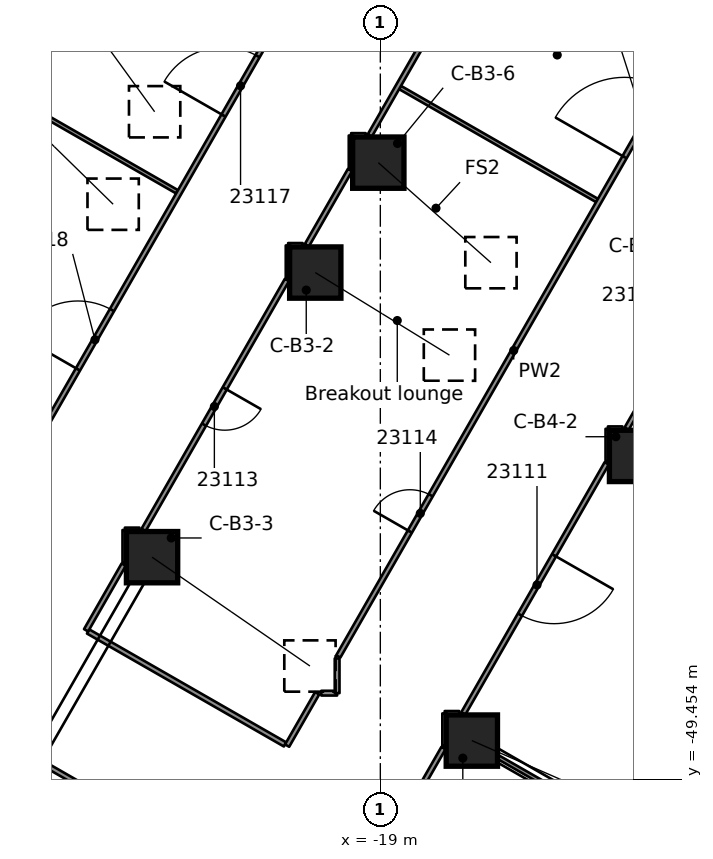
"""IFC4 building model, lengths in metres.
Left out: names, types, materials, properties, quantities, classifications, styles, units other than length and angle.
Written with IfcOpenShell. Run it as: python <this file> out.ifc"""

import sys

from ifc_helpers import new_model, si_unit, direction, frame, frame_2d, origin, origin_2d, place, context, subcontext, project, spatial, rectangle, extrude, element, fill, save


model = new_model("IFC4")
c1 = context("Model", 3, precision=1e-05, world=origin(), true_north=direction((0.0, 1.0)))
c2 = subcontext(c1, "Body", "Model", "MODEL_VIEW")
j1 = project(units=[si_unit("LENGTHUNIT", "METRE"), si_unit("PLANEANGLEUNIT", "RADIAN")], contexts=[c1])
p1 = place(None, origin())
s1 = spatial("IfcSite", under=j1, at=p1, CompositionType="ELEMENT")
p2 = place(p1, origin())
s2 = spatial("IfcBuilding", under=s1, at=p2, CompositionType="ELEMENT")
p3 = place(p2, frame((0.0, 0.0, 119.7)))
s3 = spatial("IfcBuildingStorey", under=s2, at=p3, CompositionType="ELEMENT", Elevation=119.7)
p4 = place(p3, frame((-29.126, -31.29, 0.562), z_axis=(0.59544523528, -0.58257531381, 0.553218741116), x_axis=(0.699339877275, 0.714789294865, 0.0)))
e1 = element("IfcColumn", 1, at=p4, inside=s3, PredefinedType="COLUMN", context=c2, shape_type="SweptSolid", body=[
    extrude(rectangle(XDim=1.35, YDim=1.35, at=origin_2d()), origin(), (0.0, 0.0, 1.0), 5.198),
])
p5 = place(p3, frame((-27.468, -28.399, 0.561), z_axis=(0.488269073322, -0.673037368275, 0.555530388857), x_axis=(0.809429244298, 0.587217420105, 0.0)))
e2 = element("IfcColumn", 2, at=p5, inside=s3, PredefinedType="COLUMN", context=c2, shape_type="SweptSolid", body=[
    extrude(rectangle(XDim=1.35, YDim=1.35, at=origin_2d()), origin(), (0.0, 0.0, 1.0), 5.18),
])
p6 = place(p3, frame((-20.712, -36.116, 0.554), z_axis=(0.698438997856, -0.429842046596, 0.572205191564), x_axis=(0.524126993738, 0.851640120259, 0.0)))
e3 = element("IfcColumn", 3, at=p6, inside=s3, PredefinedType="COLUMN", context=c2, shape_type="SweptSolid", body=[
    extrude(rectangle(XDim=1.35, YDim=1.35, at=origin_2d()), origin(), (0.0, 0.0, 1.0), 5.056),
])
p7 = place(p3, frame((-25.007, -43.605, 0.589), z_axis=(0.718653578755, -0.495359605874, 0.488012186948), x_axis=(0.567528313926, 0.823353880718, 0.0)))
e4 = element("IfcColumn", 4, at=p7, inside=s3, PredefinedType="COLUMN", context=c2, shape_type="SweptSolid", body=[
    extrude(rectangle(XDim=1.35, YDim=1.35, at=origin_2d()), origin(), (0.0, 0.0, 1.0), 5.782),
])
p8 = place(p3, frame((-19.053, -33.224, 0.544), z_axis=(0.602598141129, -0.535091265352, 0.592075010494), x_axis=(0.663981445411, 0.747749048913, 0.0)))
e5 = element("IfcColumn", 5, at=p8, inside=s3, PredefinedType="COLUMN", context=c2, shape_type="SweptSolid", body=[
    extrude(rectangle(XDim=1.35, YDim=1.35, at=origin_2d()), origin(), (0.0, 0.0, 1.0), 4.918),
])
p9 = place(p3, frame((-12.297, -40.941, 0.555), z_axis=(0.780519662206, -0.259596659581, 0.568681484879), x_axis=(0.315596852865, 0.948893369385, 0.0)))
e6 = element("IfcColumn", 6, at=p9, inside=s3, PredefinedType="COLUMN", context=c2, shape_type="SweptSolid", body=[
    extrude(rectangle(XDim=1.35, YDim=1.35, at=origin_2d()), origin(), (0.0, 0.0, 1.0), 5.081),
])
p10 = place(p3, frame((-16.592, -48.431, 0.588), z_axis=(0.798018191469, -0.349453953001, 0.490967311352), x_axis=(0.401128075959, 0.916021979364, 0.0)))
e7 = element("IfcColumn", 7, at=p10, inside=s3, PredefinedType="COLUMN", context=c2, shape_type="SweptSolid", body=[
    extrude(rectangle(XDim=1.35, YDim=1.35, at=origin_2d()), origin(), (0.0, 0.0, 1.0), 5.752),
])
p11 = place(p3, frame((-20.171, -53.449, 0.0), z_axis=(0.0, 0.0, 1.0), x_axis=(-0.867500052813, 0.497437089861, 0.0)))
e8 = element("IfcWall", 8, at=p11, inside=s3, PredefinedType="PARTITIONING", context=c2, shape_type="SweptSolid", body=[
    extrude(rectangle(XDim=13.179, YDim=0.125, at=frame_2d((6.59, 0.0))), origin(), (0.0, 0.0, 1.0), 3.58),
])
p12 = place(p11, frame((2.292, 0.0, 0.0)))
e9 = element("IfcOpeningElement", 9, at=p12, cuts=e8, PredefinedType="OPENING", context=c2, shape_type="SweptSolid", body=[
    extrude(rectangle(XDim=1.8, YDim=2.1, at=frame_2d((0.9, 1.05))), frame((0.0, 0.073, 0.0), z_axis=(0.0, -1.0, 0.0), x_axis=(1.0, 0.0, 0.0)), (0.0, 0.0, 1.0), 0.145),
])
p13 = place(p11, frame((9.441, 0.0, 0.0)))
e10 = element("IfcOpeningElement", 10, at=p13, cuts=e8, PredefinedType="OPENING", context=c2, shape_type="SweptSolid", body=[
    extrude(rectangle(XDim=0.9, YDim=2.1, at=frame_2d((0.45, 1.05))), frame((0.0, 0.073, 0.0), z_axis=(0.0, -1.0, 0.0), x_axis=(1.0, 0.0, 0.0)), (0.0, 0.0, 1.0), 0.145),
])
p14 = place(p3, frame((-26.689, -45.56, 0.0), z_axis=(0.0, 0.0, 1.0), x_axis=(0.867459879492, -0.497507143136, 0.0)))
e11 = element("IfcWall", 11, at=p14, inside=s3, PredefinedType="PARTITIONING", context=c2, shape_type="SweptSolid", body=[
    extrude(rectangle(XDim=5.974, YDim=0.125, at=frame_2d((2.987, 0.0))), origin(), (0.0, 0.0, 1.0), 3.58),
])
p15 = place(p3, frame((-17.219, -48.11, 0.0), z_axis=(0.0, 0.0, 1.0), x_axis=(0.867494881958, -0.49744610741, 0.0)))
e12 = element("IfcWall", 12, at=p15, inside=s3, PredefinedType="PARTITIONING", context=c2, shape_type="SweptSolid", body=[
    extrude(rectangle(XDim=16.044, YDim=0.1, at=frame_2d((8.022, 0.0))), origin(), (0.0, 0.0, 1.0), 3.58),
])
p16 = place(p3, frame((-38.261, -26.013, 0.0), z_axis=(0.0, 0.0, 1.0), x_axis=(0.867479537308, -0.497472865945, 0.0)))
e13 = element("IfcWall", 13, at=p16, inside=s3, PredefinedType="PARTITIONING", context=c2, shape_type="SweptSolid", body=[
    extrude(rectangle(XDim=16.037, YDim=0.1, at=frame_2d((8.019, 0.0))), origin(), (0.0, 0.0, 1.0), 3.58),
])
p17 = place(p3, frame((-12.924, -40.544, 0.0), z_axis=(0.0, 0.0, 1.0), x_axis=(0.867484083191, -0.497464938876, 0.0)))
e14 = element("IfcWall", 14, at=p17, inside=s3, PredefinedType="PARTITIONING", context=c2, shape_type="SweptSolid", body=[
    extrude(rectangle(XDim=15.519, YDim=0.1, at=frame_2d((7.759, 0.0))), origin(), (0.0, 0.0, 1.0), 3.58),
])
p18 = place(p3, frame((-18.481, -31.247, 0.0), z_axis=(0.0, 0.0, 1.0), x_axis=(0.867459879492, -0.497507143136, 0.0)))
e15 = element("IfcWall", 15, at=p18, inside=s3, PredefinedType="PARTITIONING", context=c2, shape_type="SweptSolid", body=[
    extrude(rectangle(XDim=5.974, YDim=0.1, at=frame_2d((2.987, 0.0))), origin(), (0.0, 0.0, 1.0), 3.58),
])
p19 = place(p3, frame((-17.306, -47.716, 0.0), z_axis=(0.0, 0.0, 1.0), x_axis=(1.0, 0.0, 0.0)))
e16 = element("IfcWall", 16, at=p19, inside=s3, PredefinedType="PARTITIONING", context=c2, shape_type="SweptSolid", body=[
    extrude(rectangle(XDim=0.382, YDim=0.125, at=frame_2d((0.191, 0.0))), origin(), (0.0, 0.0, 1.0), 3.58),
])
p20 = place(p3, frame((-20.553, -47.183, 0.0), z_axis=(0.0, 0.0, 1.0), x_axis=(1.0, 0.0, 0.0)))
e17 = element("IfcWall", 17, at=p20, inside=s3, PredefinedType="PARTITIONING", context=c2, shape_type="SweptSolid", body=[
    extrude(rectangle(XDim=0.416, YDim=0.125, at=frame_2d((0.208, 0.0))), origin(), (0.0, 0.0, 1.0), 3.58),
])
p21 = place(p3, frame((-25.722, -42.89, 0.0), z_axis=(0.0, 0.0, 1.0), x_axis=(1.0, 0.0, 0.0)))
e18 = element("IfcWall", 18, at=p21, inside=s3, PredefinedType="PARTITIONING", context=c2, shape_type="SweptSolid", body=[
    extrude(rectangle(XDim=0.384, YDim=0.125, at=frame_2d((0.192, 0.0))), origin(), (0.0, 0.0, 1.0), 3.58),
])
for number, where, z_axis, x_axis in (
    (19, (-13.011, -40.227, 0.0), (0.0, 0.0, 1.0), (1.0, 0.0, 0.0)),
    (20, (-21.426, -35.402, 0.0), (0.0, 0.0, 1.0), (1.0, 0.0, 0.0)),
):
    element("IfcWall", number, at=place(p3, frame(where, z_axis=z_axis, x_axis=x_axis)), inside=s3, PredefinedType="PARTITIONING", context=c2, shape_type="SweptSolid", body=[
        extrude(rectangle(XDim=0.382, YDim=0.125, at=frame_2d((0.191, 0.0))), origin(), (0.0, 0.0, 1.0), 3.58),
    ])
p22 = place(p3, frame((-19.768, -32.51, 0.0), z_axis=(0.0, 0.0, 1.0), x_axis=(1.0, 0.0, 0.0)))
e21 = element("IfcWall", 21, at=p22, inside=s3, PredefinedType="PARTITIONING", context=c2, shape_type="SweptSolid", body=[
    extrude(rectangle(XDim=0.383, YDim=0.125, at=frame_2d((0.191, 0.0))), origin(), (0.0, 0.0, 1.0), 3.58),
])
p23 = place(p3, frame((-21.453, -48.563, 0.0), z_axis=(0.0, 0.0, 1.0), x_axis=(0.497743370952, 0.867324354941, 0.0)))
e22 = element("IfcWall", 22, at=p23, inside=s3, PredefinedType="PARTITIONING", context=c2, shape_type="SweptSolid", body=[
    extrude(rectangle(XDim=1.589, YDim=0.125, at=frame_2d((0.794, 0.0))), origin(), (0.0, 0.0, 1.0), 3.58),
])
p24 = place(p3, frame((-20.12, -53.478, 0.0), z_axis=(0.0, 0.0, 1.0), x_axis=(0.497511151809, 0.867457580418, 0.0)))
e23 = element("IfcWall", 23, at=p24, inside=s3, PredefinedType="PARTITIONING", context=c2, shape_type="SweptSolid", body=[
    extrude(rectangle(XDim=5.592, YDim=0.125, at=frame_2d((2.796, 0.0))), origin(), (0.0, 0.0, 1.0), 3.58),
])
p25 = place(p3, frame((-13.043, -41.137, 0.0), z_axis=(0.0, 0.0, 1.0), x_axis=(-0.497476495559, -0.867477455826, 0.0)))
e24 = element("IfcWall", 24, at=p25, inside=s3, PredefinedType="PARTITIONING", context=c2, shape_type="SweptSolid", body=[
    extrude(rectangle(XDim=7.584, YDim=0.125, at=frame_2d((3.792, 0.0))), origin(), (0.0, 0.0, 1.0), 3.58),
])
p26 = place(p25, frame((2.788, 0.0, 0.0)))
e25 = element("IfcOpeningElement", 25, at=p26, cuts=e24, PredefinedType="OPENING", context=c2, shape_type="SweptSolid", body=[
    extrude(rectangle(XDim=1.8, YDim=2.1, at=frame_2d((0.9, 1.05))), frame((0.0, 0.073, 0.0), z_axis=(0.0, -1.0, 0.0), x_axis=(1.0, 0.0, 0.0)), (0.0, 0.0, 1.0), 0.145),
])
p27 = place(p3, frame((-11.385, -38.246, 0.0), z_axis=(0.0, 0.0, 1.0), x_axis=(-0.497325070569, -0.867564276687, 0.0)))
e26 = element("IfcWall", 26, at=p27, inside=s3, PredefinedType="PARTITIONING", context=c2, shape_type="SweptSolid", body=[
    extrude(rectangle(XDim=2.282, YDim=0.125, at=frame_2d((1.141, 0.0))), origin(), (0.0, 0.0, 1.0), 3.58),
])
p28 = place(p27, frame((0.538, 0.0, 0.0)))
e27 = element("IfcOpeningElement", 27, at=p28, cuts=e26, PredefinedType="OPENING", context=c2, shape_type="SweptSolid", body=[
    extrude(rectangle(XDim=1.1, YDim=2.1, at=frame_2d((0.55, 1.05))), frame((0.0, 0.073, 0.0), z_axis=(0.0, -1.0, 0.0), x_axis=(1.0, 0.0, 0.0)), (0.0, 0.0, 1.0), 0.145),
])
p29 = place(p3, frame((-20.106, -46.216, 0.0), z_axis=(0.0, 0.0, 1.0), x_axis=(0.497433217502, 0.867502273268, 0.0)))
e28 = element("IfcWall", 28, at=p29, inside=s3, PredefinedType="PARTITIONING", context=c2, shape_type="SweptSolid", body=[
    extrude(rectangle(XDim=18.559, YDim=0.125, at=frame_2d((9.28, 0.0))), origin(), (0.0, 0.0, 1.0), 3.58),
])
p30 = place(p29, frame((15.143, 0.0, 0.0)))
e29 = element("IfcOpeningElement", 29, at=p30, cuts=e28, PredefinedType="OPENING", context=c2, shape_type="SweptSolid", body=[
    extrude(rectangle(XDim=2.1, YDim=2.1, at=frame_2d((1.05, 1.05))), frame((0.0, 0.073, 0.0), z_axis=(0.0, -1.0, 0.0), x_axis=(1.0, 0.0, 0.0)), (0.0, 0.0, 1.0), 0.145),
])
p31 = place(p29, frame((3.788, 0.0, 0.0)))
e30 = element("IfcOpeningElement", 30, at=p31, cuts=e28, PredefinedType="OPENING", context=c2, shape_type="SweptSolid", body=[
    extrude(rectangle(XDim=1.1, YDim=2.1, at=frame_2d((0.55, 1.05))), frame((0.0, 0.073, 0.0), z_axis=(0.0, -1.0, 0.0), x_axis=(1.0, 0.0, 0.0)), (0.0, 0.0, 1.0), 0.145),
])
p32 = place(p3, frame((-21.458, -36.312, 0.0), z_axis=(0.0, 0.0, 1.0), x_axis=(-0.497504635005, -0.867461317955, 0.0)))
e31 = element("IfcWall", 31, at=p32, inside=s3, PredefinedType="PARTITIONING", context=c2, shape_type="SweptSolid", body=[
    extrude(rectangle(XDim=7.582, YDim=0.125, at=frame_2d((3.791, 0.0))), origin(), (0.0, 0.0, 1.0), 3.58),
])
p33 = place(p32, frame((3.288, 0.0, 0.0)))
e32 = element("IfcOpeningElement", 32, at=p33, cuts=e31, PredefinedType="OPENING", context=c2, shape_type="SweptSolid", body=[
    extrude(rectangle(XDim=1.1, YDim=2.1, at=frame_2d((0.55, 1.05))), frame((0.0, 0.073, 0.0), z_axis=(0.0, -1.0, 0.0), x_axis=(1.0, 0.0, 0.0)), (0.0, 0.0, 1.0), 0.145),
])
p34 = place(p3, frame((-20.935, -35.4, 0.0), z_axis=(0.0, 0.0, 1.0), x_axis=(0.497462427817, 0.86748552317, 0.0)))
e33 = element("IfcWall", 33, at=p34, inside=s3, PredefinedType="PARTITIONING", context=c2, shape_type="SweptSolid", body=[
    extrude(rectangle(XDim=2.283, YDim=0.125, at=frame_2d((1.142, 0.0))), origin(), (0.0, 0.0, 1.0), 3.58),
])
p35 = place(p3, frame((-19.277, -32.509, 0.0), z_axis=(0.0, 0.0, 1.0), x_axis=(0.497782718783, 0.867301772673, 0.0)))
e34 = element("IfcWall", 34, at=p35, inside=s3, PredefinedType="PARTITIONING", context=c2, shape_type="SweptSolid", body=[
    extrude(rectangle(XDim=7.098, YDim=0.125, at=frame_2d((3.549, 0.0))), origin(), (0.0, 0.0, 1.0), 3.58),
])
p36 = place(p3, frame((-26.743, -45.529, 0.0), z_axis=(0.0, 0.0, 1.0), x_axis=(0.497102378574, 0.867691895327, 0.0)))
e35 = element("IfcWall", 35, at=p36, inside=s3, PredefinedType="PARTITIONING", context=c2, shape_type="SweptSolid", body=[
    extrude(rectangle(XDim=1.991, YDim=0.125, at=frame_2d((0.996, 0.0))), origin(), (0.0, 0.0, 1.0), 3.58),
])
p37 = place(p3, frame((-28.623, -41.57, 0.0), z_axis=(0.0, 0.0, 1.0), x_axis=(0.497445996274, 0.867494945686, 0.0)))
e36 = element("IfcWall", 36, at=p37, inside=s3, PredefinedType="PARTITIONING", context=c2, shape_type="SweptSolid", body=[
    extrude(rectangle(XDim=19.081, YDim=0.125, at=frame_2d((9.541, 0.0))), origin(), (0.0, 0.0, 1.0), 3.58),
])
p38 = place(p37, frame((11.051, 0.0, 0.0)))
e37 = element("IfcOpeningElement", 37, at=p38, cuts=e36, PredefinedType="OPENING", context=c2, shape_type="SweptSolid", body=[
    extrude(rectangle(XDim=1.8, YDim=2.1, at=frame_2d((0.9, 1.05))), frame((0.0, 0.073, 0.0), z_axis=(0.0, -1.0, 0.0), x_axis=(1.0, 0.0, 0.0)), (0.0, 0.0, 1.0), 0.145),
])
p39 = place(p37, frame((3.35, 0.0, 0.0)))
e38 = element("IfcOpeningElement", 38, at=p39, cuts=e36, PredefinedType="OPENING", context=c2, shape_type="SweptSolid", body=[
    extrude(rectangle(XDim=1.8, YDim=2.1, at=frame_2d((0.9, 1.05))), frame((0.0, 0.073, 0.0), z_axis=(0.0, -1.0, 0.0), x_axis=(1.0, 0.0, 0.0)), (0.0, 0.0, 1.0), 0.145),
])
p40 = place(p3, frame((-13.011, -41.082, 0.0), z_axis=(0.0, 0.0, 1.0), x_axis=(0.0, 1.0, 0.0)))
e39 = element("IfcWall", 39, at=p40, inside=s3, PredefinedType="PARTITIONING", context=c2, shape_type="SweptSolid", body=[
    extrude(rectangle(XDim=0.855, YDim=0.125, at=frame_2d((0.427, 0.0))), origin(), (0.0, 0.0, 1.0), 3.58),
])
p41 = place(p3, frame((-17.306, -48.572, 0.0), z_axis=(0.0, 0.0, 1.0), x_axis=(0.0, 1.0, 0.0)))
e40 = element("IfcWall", 40, at=p41, inside=s3, PredefinedType="PARTITIONING", context=c2, shape_type="SweptSolid", body=[
    extrude(rectangle(XDim=0.856, YDim=0.125, at=frame_2d((0.428, 0.0))), origin(), (0.0, 0.0, 1.0), 3.58),
])
p42 = place(p3, frame((-19.768, -33.365, 0.0), z_axis=(0.0, 0.0, 1.0), x_axis=(0.0, 1.0, 0.0)))
e41 = element("IfcWall", 41, at=p42, inside=s3, PredefinedType="PARTITIONING", context=c2, shape_type="SweptSolid", body=[
    extrude(rectangle(XDim=0.855, YDim=0.125, at=frame_2d((0.427, 0.0))), origin(), (0.0, 0.0, 1.0), 3.58),
])
p43 = place(p3, frame((-20.137, -47.183, 0.0), z_axis=(0.0, 0.0, 1.0), x_axis=(0.0, 1.0, 0.0)))
e42 = element("IfcWall", 42, at=p43, inside=s3, PredefinedType="PARTITIONING", context=c2, shape_type="SweptSolid", body=[
    extrude(rectangle(XDim=0.913, YDim=0.125, at=frame_2d((0.457, 0.0))), origin(), (0.0, 0.0, 1.0), 3.58),
])
p44 = place(p3, frame((-21.426, -36.258, 0.0), z_axis=(0.0, 0.0, 1.0), x_axis=(0.0, 1.0, 0.0)))
e43 = element("IfcWall", 43, at=p44, inside=s3, PredefinedType="PARTITIONING", context=c2, shape_type="SweptSolid", body=[
    extrude(rectangle(XDim=0.856, YDim=0.125, at=frame_2d((0.428, 0.0))), origin(), (0.0, 0.0, 1.0), 3.58),
])
p45 = place(p3, frame((-25.722, -43.747, 0.0), z_axis=(0.0, 0.0, 1.0), x_axis=(0.0, 1.0, 0.0)))
e44 = element("IfcWall", 44, at=p45, inside=s3, PredefinedType="PARTITIONING", context=c2, shape_type="SweptSolid", body=[
    extrude(rectangle(XDim=0.857, YDim=0.125, at=frame_2d((0.429, 0.0))), origin(), (0.0, 0.0, 1.0), 3.58),
])
p46 = place(p26, origin())
e45 = element("IfcDoor", 45, at=p46, inside=s3, OperationType="DOUBLE_DOOR_SINGLE_SWING", PredefinedType="DOOR", context=c2, shape_type="SweptSolid", body=[
    extrude(rectangle(XDim=1.8, YDim=2.1, at=frame_2d((0.9, 1.05))), frame((0.0, 0.025, 0.0), z_axis=(0.0, -1.0, 0.0), x_axis=(1.0, 0.0, 0.0)), (0.0, 0.0, 1.0), 0.05),
])
fill(e25, e45)
p47 = place(p30, origin())
e46 = element("IfcDoor", 46, at=p47, inside=s3, OperationType="DOUBLE_DOOR_SINGLE_SWING", PredefinedType="DOOR", context=c2, shape_type="SweptSolid", body=[
    extrude(rectangle(XDim=2.1, YDim=2.1, at=frame_2d((1.05, 1.05))), frame((0.0, 0.025, 0.0), z_axis=(0.0, -1.0, 0.0), x_axis=(1.0, 0.0, 0.0)), (0.0, 0.0, 1.0), 0.05),
])
fill(e29, e46)
p48 = place(p33, origin())
e47 = element("IfcDoor", 47, at=p48, inside=s3, OperationType="SINGLE_SWING_RIGHT", PredefinedType="DOOR", context=c2, shape_type="SweptSolid", body=[
    extrude(rectangle(XDim=1.1, YDim=2.1, at=frame_2d((0.55, 1.05))), frame((0.0, 0.025, 0.0), z_axis=(0.0, -1.0, 0.0), x_axis=(1.0, 0.0, 0.0)), (0.0, 0.0, 1.0), 0.05),
])
fill(e32, e47)
p49 = place(p31, origin())
e48 = element("IfcDoor", 48, at=p49, inside=s3, OperationType="SINGLE_SWING_LEFT", PredefinedType="DOOR", context=c2, shape_type="SweptSolid", body=[
    extrude(rectangle(XDim=1.1, YDim=2.1, at=frame_2d((0.55, 1.05))), frame((0.0, 0.025, 0.0), z_axis=(0.0, -1.0, 0.0), x_axis=(1.0, 0.0, 0.0)), (0.0, 0.0, 1.0), 0.05),
])
fill(e30, e48)
p50 = place(p38, origin())
e49 = element("IfcDoor", 49, at=p50, inside=s3, OperationType="DOUBLE_DOOR_SINGLE_SWING", PredefinedType="DOOR", context=c2, shape_type="SweptSolid", body=[
    extrude(rectangle(XDim=1.8, YDim=2.1, at=frame_2d((0.9, 1.05))), frame((0.0, 0.025, 0.0), z_axis=(0.0, -1.0, 0.0), x_axis=(1.0, 0.0, 0.0)), (0.0, 0.0, 1.0), 0.05),
])
fill(e37, e49)
p51 = place(p39, origin())
e50 = element("IfcDoor", 50, at=p51, inside=s3, OperationType="DOUBLE_DOOR_SINGLE_SWING", PredefinedType="DOOR", context=c2, shape_type="SweptSolid", body=[
    extrude(rectangle(XDim=1.8, YDim=2.1, at=frame_2d((0.9, 1.05))), frame((0.0, 0.025, 0.0), z_axis=(0.0, -1.0, 0.0), x_axis=(1.0, 0.0, 0.0)), (0.0, 0.0, 1.0), 0.05),
])
fill(e38, e50)
save(model, sys.argv[1])
